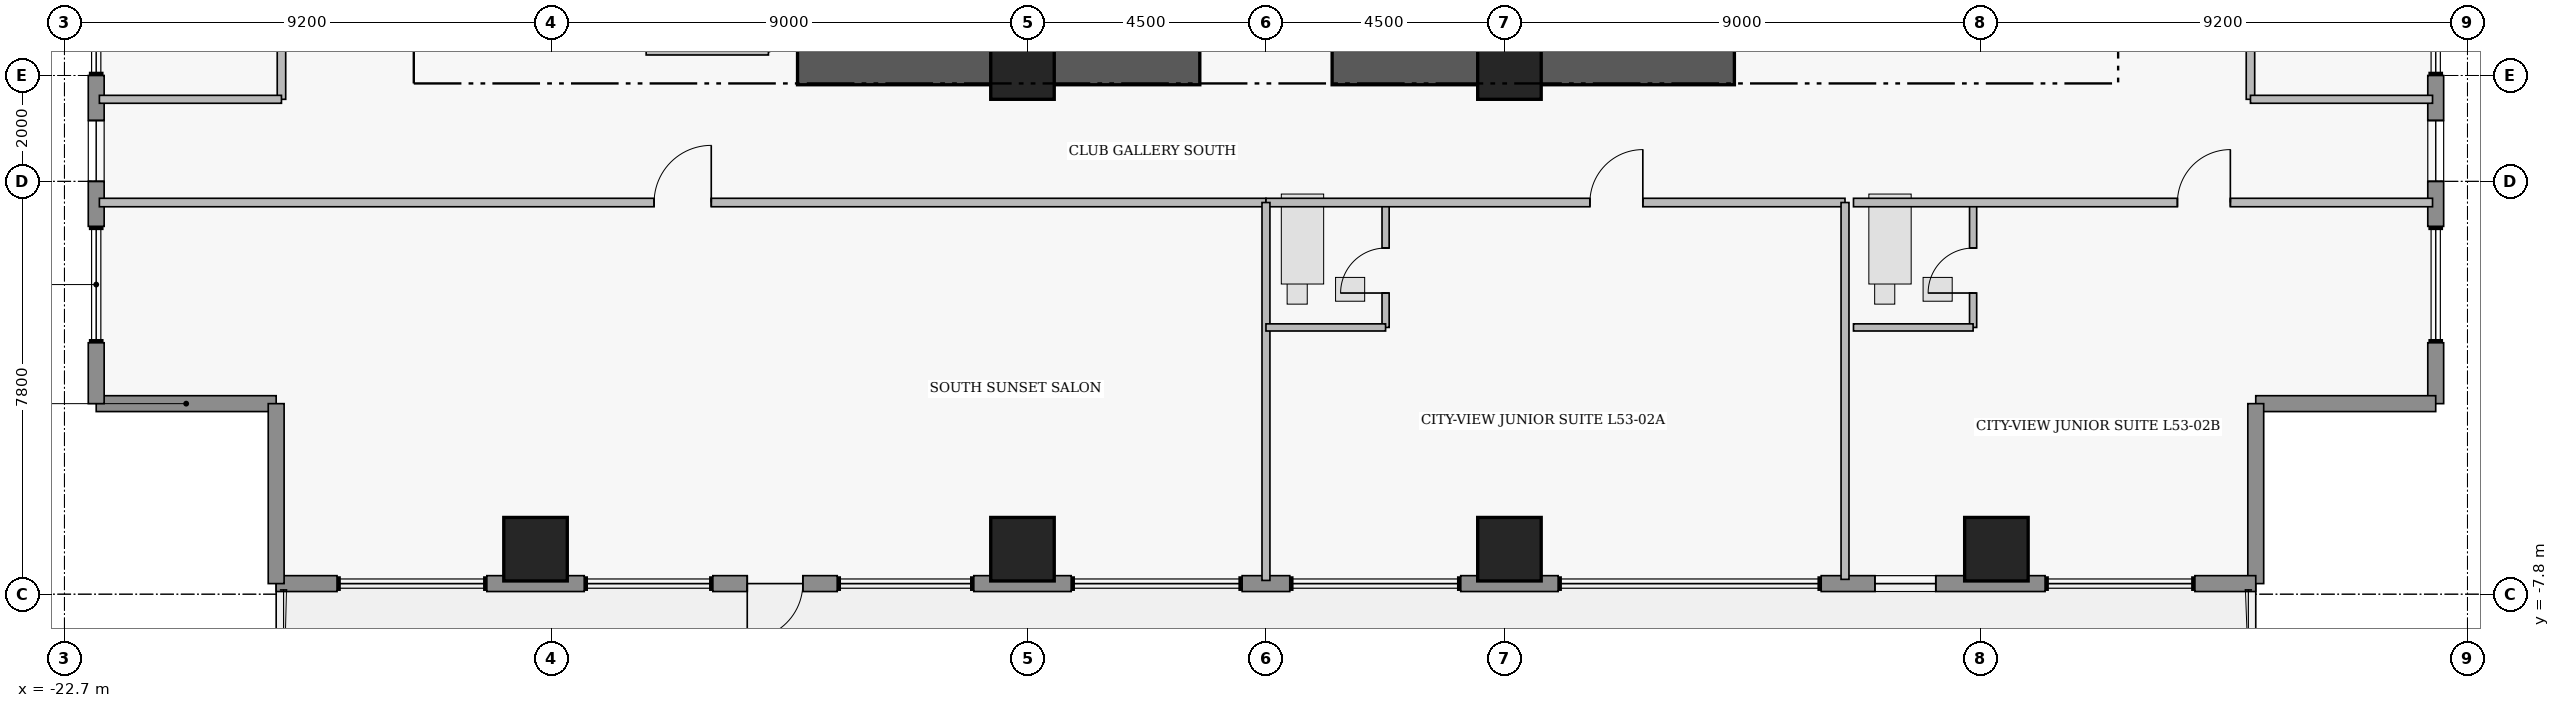
"""IFC4 building model, lengths in metres.
Left out: names, types, materials, properties, quantities, classifications, styles, units other than length and angle.
Written with IfcOpenShell. Run it as: python <this file> out.ifc"""

import sys

from ifc_helpers import new_model, si_unit, direction, frame, frame_2d, origin, origin_2d, place, context, subcontext, project, spatial, rectangle, extrude, element, fill, save


model = new_model("IFC4")
c1 = context("Model", 3, precision=1e-05, world=origin(), true_north=direction((0.0, 1.0)))
c2 = subcontext(c1, "Body", "Model", "MODEL_VIEW")
j1 = project(units=[si_unit("LENGTHUNIT", "METRE"), si_unit("PLANEANGLEUNIT", "RADIAN")], contexts=[c1])
p1 = place(None, origin())
s1 = spatial("IfcSite", under=j1, at=p1, CompositionType="ELEMENT")
p2 = place(p1, origin())
s2 = spatial("IfcBuilding", under=s1, at=p2, CompositionType="ELEMENT")
p3 = place(p2, frame((0.0, 0.0, 211.15)))
s3 = spatial("IfcBuildingStorey", under=s2, at=p3, CompositionType="ELEMENT", Elevation=211.15)
for number, where, z_axis, x_axis in (
    (1, (-8.85, 2.15, 0.0), (0.0, 0.0, 1.0), (1.0, 0.0, 0.0)),
    (2, (1.25, 2.15, 0.0), (0.0, 0.0, 1.0), (1.0, 0.0, 0.0)),
):
    element("IfcWall", number, at=place(p3, frame(where, z_axis=z_axis, x_axis=x_axis)), inside=s3, PredefinedType="SHEAR", context=c2, shape_type="SweptSolid", body=[
        extrude(rectangle(XDim=7.6, YDim=0.65, at=frame_2d((3.8, 0.0))), origin(), (0.0, 0.0, 1.0), 3.53),
    ])
for number, where, z_axis, x_axis in (
    (3, (-4.6, 2.15, 0.0), (0.0, 0.0, 1.0), (1.0, 0.0, 0.0)),
    (4, (4.6, 2.15, 0.0), (0.0, 0.0, 1.0), (1.0, 0.0, 0.0)),
    (5, (-13.8, -6.95, 0.0), (0.0, 0.0, 1.0), (1.0, 0.0, 0.0)),
    (6, (-4.6, -6.95, 0.0), (0.0, 0.0, 1.0), (1.0, 0.0, 0.0)),
    (7, (4.6, -6.95, 0.0), (0.0, 0.0, 1.0), (1.0, 0.0, 0.0)),
    (8, (13.8, -6.95, 0.0), (0.0, 0.0, 1.0), (1.0, 0.0, 0.0)),
):
    element("IfcColumn", number, at=place(p3, frame(where, z_axis=z_axis, x_axis=x_axis)), inside=s3, PredefinedType="COLUMN", context=c2, shape_type="SweptSolid", body=[
        extrude(rectangle(XDim=1.2, YDim=1.2, at=origin_2d()), origin(), (0.0, 0.0, 1.0), 3.75),
    ])
p4 = place(p3, frame((-18.7, -4.2, 0.0), z_axis=(0.0, 0.0, 1.0), x_axis=(-1.0, 0.0, 0.0)))
e9 = element("IfcWall", 9, at=p4, inside=s3, PredefinedType="STANDARD", context=c2, shape_type="SweptSolid", body=[
    extrude(rectangle(XDim=3.4, YDim=0.3, at=frame_2d((1.7, 0.0))), origin(), (0.0, 0.0, 1.0), 3.53),
])
p5 = place(p3, frame((-22.1, -4.2, 0.0), z_axis=(0.0, 0.0, 1.0), x_axis=(0.0, 1.0, 0.0)))
e10 = element("IfcWall", 10, at=p5, inside=s3, PredefinedType="STANDARD", context=c2, shape_type="SweptSolid", body=[
    extrude(rectangle(XDim=1.15, YDim=0.3, at=frame_2d((0.575, 0.0))), origin(), (0.0, 0.0, 1.0), 3.53),
])
p6 = place(p3, frame((-22.1, -0.85, 0.0), z_axis=(0.0, 0.0, 1.0), x_axis=(0.0, 1.0, 0.0)))
e11 = element("IfcWall", 11, at=p6, inside=s3, PredefinedType="STANDARD", context=c2, shape_type="SweptSolid", body=[
    extrude(rectangle(XDim=2.85, YDim=0.3, at=frame_2d((1.425, 0.0))), origin(), (0.0, 0.0, 1.0), 3.53),
])
p7 = place(p6, frame((0.85, 0.0, 0.95)))
e12 = element("IfcOpeningElement", 12, at=p7, cuts=e11, PredefinedType="OPENING", context=c2, shape_type="SweptSolid", body=[
    extrude(rectangle(XDim=1.15, YDim=1.55, at=frame_2d((0.575, 0.775))), frame((0.0, 0.16, 0.0), z_axis=(0.0, -1.0, 0.0), x_axis=(1.0, 0.0, 0.0)), (0.0, 0.0, 1.0), 0.32),
])
p8 = place(p3, frame((22.1, 2.0, 0.0), z_axis=(0.0, 0.0, 1.0), x_axis=(0.0, -1.0, 0.0)))
e13 = element("IfcWall", 13, at=p8, inside=s3, PredefinedType="STANDARD", context=c2, shape_type="SweptSolid", body=[
    extrude(rectangle(XDim=2.85, YDim=0.3, at=frame_2d((1.425, 0.0))), origin(), (0.0, 0.0, 1.0), 3.53),
])
p9 = place(p8, frame((0.85, 0.0, 0.95)))
e14 = element("IfcOpeningElement", 14, at=p9, cuts=e13, PredefinedType="OPENING", context=c2, shape_type="SweptSolid", body=[
    extrude(rectangle(XDim=1.15, YDim=1.55, at=frame_2d((0.575, 0.775))), frame((0.0, 0.16, 0.0), z_axis=(0.0, -1.0, 0.0), x_axis=(1.0, 0.0, 0.0)), (0.0, 0.0, 1.0), 0.32),
])
p10 = place(p3, frame((22.1, -3.05, 0.0), z_axis=(0.0, 0.0, 1.0), x_axis=(0.0, -1.0, 0.0)))
e15 = element("IfcWall", 15, at=p10, inside=s3, PredefinedType="STANDARD", context=c2, shape_type="SweptSolid", body=[
    extrude(rectangle(XDim=1.15, YDim=0.3, at=frame_2d((0.575, 0.0))), origin(), (0.0, 0.0, 1.0), 3.53),
])
for number, where, z_axis, x_axis in (
    (16, (22.1, -4.2, 0.0), (0.0, 0.0, 1.0), (-1.0, 0.0, 0.0)),
    (17, (18.7, -4.2, 0.0), (0.0, 0.0, 1.0), (0.0, -1.0, 0.0)),
):
    element("IfcWall", number, at=place(p3, frame(where, z_axis=z_axis, x_axis=x_axis)), inside=s3, PredefinedType="STANDARD", context=c2, shape_type="SweptSolid", body=[
        extrude(rectangle(XDim=3.4, YDim=0.3, at=frame_2d((1.7, 0.0))), origin(), (0.0, 0.0, 1.0), 3.53),
    ])
p11 = place(p3, frame((18.7, -7.6, 0.0), z_axis=(0.0, 0.0, 1.0), x_axis=(-1.0, 0.0, 0.0)))
e18 = element("IfcWall", 18, at=p11, inside=s3, PredefinedType="STANDARD", context=c2, shape_type="SweptSolid", body=[
    extrude(rectangle(XDim=1.15, YDim=0.3, at=frame_2d((0.575, 0.0))), origin(), (0.0, 0.0, 1.0), 3.53),
])
p12 = place(p3, frame((14.72, -7.6, 0.0), z_axis=(0.0, 0.0, 1.0), x_axis=(-1.0, 0.0, 0.0)))
e19 = element("IfcWall", 19, at=p12, inside=s3, PredefinedType="STANDARD", context=c2, shape_type="SweptSolid", body=[
    extrude(rectangle(XDim=4.23, YDim=0.3, at=frame_2d((2.115, 0.0))), origin(), (0.0, 0.0, 1.0), 3.53),
])
p13 = place(p12, frame((2.065, 0.0, 0.95)))
e20 = element("IfcOpeningElement", 20, at=p13, cuts=e19, PredefinedType="OPENING", context=c2, shape_type="SweptSolid", body=[
    extrude(rectangle(XDim=1.15, YDim=1.55, at=frame_2d((0.575, 0.775))), frame((0.0, 0.16, 0.0), z_axis=(0.0, -1.0, 0.0), x_axis=(1.0, 0.0, 0.0)), (0.0, 0.0, 1.0), 0.32),
])
p14 = place(p3, frame((5.52, -7.6, 0.0), z_axis=(0.0, 0.0, 1.0), x_axis=(-1.0, 0.0, 0.0)))
e21 = element("IfcWall", 21, at=p14, inside=s3, PredefinedType="STANDARD", context=c2, shape_type="SweptSolid", body=[
    extrude(rectangle(XDim=1.84, YDim=0.3, at=frame_2d((0.92, 0.0))), origin(), (0.0, 0.0, 1.0), 3.53),
])
p15 = place(p3, frame((0.45, -7.6, 0.0), z_axis=(0.0, 0.0, 1.0), x_axis=(-1.0, 0.0, 0.0)))
e22 = element("IfcWall", 22, at=p15, inside=s3, PredefinedType="STANDARD", context=c2, shape_type="SweptSolid", body=[
    extrude(rectangle(XDim=0.9, YDim=0.3, at=frame_2d((0.45, 0.0))), origin(), (0.0, 0.0, 1.0), 3.53),
])
p16 = place(p3, frame((-3.68, -7.6, 0.0), z_axis=(0.0, 0.0, 1.0), x_axis=(-1.0, 0.0, 0.0)))
e23 = element("IfcWall", 23, at=p16, inside=s3, PredefinedType="STANDARD", context=c2, shape_type="SweptSolid", body=[
    extrude(rectangle(XDim=1.84, YDim=0.3, at=frame_2d((0.92, 0.0))), origin(), (0.0, 0.0, 1.0), 3.53),
])
p17 = place(p3, frame((-8.1, -7.6, 0.0), z_axis=(0.0, 0.0, 1.0), x_axis=(-1.0, 0.0, 0.0)))
e24 = element("IfcWall", 24, at=p17, inside=s3, PredefinedType="STANDARD", context=c2, shape_type="SweptSolid", body=[
    extrude(rectangle(XDim=2.35, YDim=0.3, at=frame_2d((1.175, 0.0))), origin(), (0.0, 0.0, 1.0), 3.53),
])
p18 = place(p17, frame((0.65, 0.0, 0.0)))
e25 = element("IfcOpeningElement", 25, at=p18, cuts=e24, PredefinedType="OPENING", context=c2, shape_type="SweptSolid", body=[
    extrude(rectangle(XDim=1.05, YDim=2.2, at=frame_2d((0.525, 1.1))), frame((0.0, 0.16, 0.0), z_axis=(0.0, -1.0, 0.0), x_axis=(1.0, 0.0, 0.0)), (0.0, 0.0, 1.0), 0.32),
])
p19 = place(p3, frame((-12.88, -7.6, 0.0), z_axis=(0.0, 0.0, 1.0), x_axis=(-1.0, 0.0, 0.0)))
e26 = element("IfcWall", 26, at=p19, inside=s3, PredefinedType="STANDARD", context=c2, shape_type="SweptSolid", body=[
    extrude(rectangle(XDim=1.84, YDim=0.3, at=frame_2d((0.92, 0.0))), origin(), (0.0, 0.0, 1.0), 3.53),
])
p20 = place(p3, frame((-17.55, -7.6, 0.0), z_axis=(0.0, 0.0, 1.0), x_axis=(-1.0, 0.0, 0.0)))
e27 = element("IfcWall", 27, at=p20, inside=s3, PredefinedType="STANDARD", context=c2, shape_type="SweptSolid", body=[
    extrude(rectangle(XDim=1.15, YDim=0.3, at=frame_2d((0.575, 0.0))), origin(), (0.0, 0.0, 1.0), 3.53),
])
p21 = place(p3, frame((-18.7, -7.6, 0.0), z_axis=(0.0, 0.0, 1.0), x_axis=(0.0, 1.0, 0.0)))
e28 = element("IfcWall", 28, at=p21, inside=s3, PredefinedType="STANDARD", context=c2, shape_type="SweptSolid", body=[
    extrude(rectangle(XDim=3.4, YDim=0.3, at=frame_2d((1.7, 0.0))), origin(), (0.0, 0.0, 1.0), 3.53),
])
p22 = place(p3, frame((-22.04, -0.4, 0.0), z_axis=(0.0, 0.0, 1.0), x_axis=(1.0, 0.0, 0.0)))
e29 = element("IfcWall", 29, at=p22, inside=s3, PredefinedType="PARTITIONING", context=c2, shape_type="SweptSolid", body=[
    extrude(rectangle(XDim=22.04, YDim=0.16, at=frame_2d((11.02, 0.0))), origin(), (0.0, 0.0, 1.0), 3.53),
])
p23 = place(p22, frame((10.48, 0.0, 0.0)))
e30 = element("IfcOpeningElement", 30, at=p23, cuts=e29, PredefinedType="OPENING", context=c2, shape_type="SweptSolid", body=[
    extrude(rectangle(XDim=1.08, YDim=2.18, at=frame_2d((0.54, 1.09))), frame((0.0, 0.09, 0.0), z_axis=(0.0, -1.0, 0.0), x_axis=(1.0, 0.0, 0.0)), (0.0, 0.0, 1.0), 0.18),
])
p24 = place(p3, frame((2.26, -2.76, 0.0), z_axis=(0.0, 0.0, 1.0), x_axis=(0.0, 1.0, 0.0)))
e31 = element("IfcWall", 31, at=p24, inside=s3, PredefinedType="PLUMBINGWALL", context=c2, shape_type="SweptSolid", body=[
    extrude(rectangle(XDim=2.36, YDim=0.135, at=frame_2d((1.18, 0.0))), origin(), (0.0, 0.0, 1.0), 3.53),
])
p25 = place(p24, frame((0.65, 0.0, 0.0)))
e32 = element("IfcOpeningElement", 32, at=p25, cuts=e31, PredefinedType="OPENING", context=c2, shape_type="SweptSolid", body=[
    extrude(rectangle(XDim=0.85, YDim=2.1, at=frame_2d((0.425, 1.05))), frame((0.0, 0.077, 0.0), z_axis=(0.0, -1.0, 0.0), x_axis=(1.0, 0.0, 0.0)), (0.0, 0.0, 1.0), 0.155),
])
p26 = place(p3, frame((0.0, -0.4, 0.0), z_axis=(0.0, 0.0, 1.0), x_axis=(1.0, 0.0, 0.0)))
e33 = element("IfcWall", 33, at=p26, inside=s3, PredefinedType="PARTITIONING", context=c2, shape_type="SweptSolid", body=[
    extrude(rectangle(XDim=10.94, YDim=0.16, at=frame_2d((5.47, 0.0))), origin(), (0.0, 0.0, 1.0), 3.53),
])
p27 = place(p26, frame((6.12, 0.0, 0.0)))
e34 = element("IfcOpeningElement", 34, at=p27, cuts=e33, PredefinedType="OPENING", context=c2, shape_type="SweptSolid", body=[
    extrude(rectangle(XDim=1.0, YDim=2.15, at=frame_2d((0.5, 1.075))), frame((0.0, 0.09, 0.0), z_axis=(0.0, -1.0, 0.0), x_axis=(1.0, 0.0, 0.0)), (0.0, 0.0, 1.0), 0.18),
])
p28 = place(p3, frame((13.36, -2.76, 0.0), z_axis=(0.0, 0.0, 1.0), x_axis=(0.0, 1.0, 0.0)))
e35 = element("IfcWall", 35, at=p28, inside=s3, PredefinedType="PLUMBINGWALL", context=c2, shape_type="SweptSolid", body=[
    extrude(rectangle(XDim=2.36, YDim=0.135, at=frame_2d((1.18, 0.0))), origin(), (0.0, 0.0, 1.0), 2.923),
])
p29 = place(p28, frame((0.65, 0.0, 0.0)))
e36 = element("IfcOpeningElement", 36, at=p29, cuts=e35, PredefinedType="OPENING", context=c2, shape_type="SweptSolid", body=[
    extrude(rectangle(XDim=0.85, YDim=2.1, at=frame_2d((0.425, 1.05))), frame((0.0, 0.077, 0.0), z_axis=(0.0, -1.0, 0.0), x_axis=(1.0, 0.0, 0.0)), (0.0, 0.0, 1.0), 0.155),
])
p30 = place(p3, frame((11.1, -0.4, 0.0), z_axis=(0.0, 0.0, 1.0), x_axis=(1.0, 0.0, 0.0)))
e37 = element("IfcWall", 37, at=p30, inside=s3, PredefinedType="PARTITIONING", context=c2, shape_type="SweptSolid", body=[
    extrude(rectangle(XDim=10.94, YDim=0.16, at=frame_2d((5.47, 0.0))), origin(), (0.0, 0.0, 1.0), 3.53),
])
p31 = place(p30, frame((6.12, 0.0, 0.0)))
e38 = element("IfcOpeningElement", 38, at=p31, cuts=e37, PredefinedType="OPENING", context=c2, shape_type="SweptSolid", body=[
    extrude(rectangle(XDim=1.0, YDim=2.15, at=frame_2d((0.5, 1.075))), frame((0.0, 0.09, 0.0), z_axis=(0.0, -1.0, 0.0), x_axis=(1.0, 0.0, 0.0)), (0.0, 0.0, 1.0), 0.18),
])
p32 = place(p3, frame((18.6, 1.55, 0.0), z_axis=(0.0, 0.0, 1.0), x_axis=(0.0, 1.0, 0.0)))
e39 = element("IfcWall", 39, at=p32, inside=s3, PredefinedType="PARTITIONING", context=c2, shape_type="SweptSolid", body=[
    extrude(rectangle(XDim=5.2, YDim=0.16, at=frame_2d((2.6, 0.0))), origin(), (0.0, 0.0, 1.0), 3.53),
])
p33 = place(p32, frame((2.14, 0.0, 0.0)))
e40 = element("IfcOpeningElement", 40, at=p33, cuts=e39, PredefinedType="OPENING", context=c2, shape_type="SweptSolid", body=[
    extrude(rectangle(XDim=0.92, YDim=2.12, at=frame_2d((0.46, 1.06))), frame((0.0, 0.09, 0.0), z_axis=(0.0, -1.0, 0.0), x_axis=(1.0, 0.0, 0.0)), (0.0, 0.0, 1.0), 0.18),
])
p34 = place(p3, frame((-18.6, 1.55, 0.0), z_axis=(0.0, 0.0, 1.0), x_axis=(0.0, 1.0, 0.0)))
e41 = element("IfcWall", 41, at=p34, inside=s3, PredefinedType="PARTITIONING", context=c2, shape_type="SweptSolid", body=[
    extrude(rectangle(XDim=13.3, YDim=0.16, at=frame_2d((6.65, 0.0))), origin(), (0.0, 0.0, 1.0), 3.53),
])
p35 = place(p34, frame((6.175, 0.0, 0.0)))
e42 = element("IfcOpeningElement", 42, at=p35, cuts=e41, PredefinedType="OPENING", context=c2, shape_type="SweptSolid", body=[
    extrude(rectangle(XDim=0.95, YDim=2.15, at=frame_2d((0.475, 1.075))), frame((0.0, 0.09, 0.0), z_axis=(0.0, -1.0, 0.0), x_axis=(1.0, 0.0, 0.0)), (0.0, 0.0, 1.0), 0.18),
])
p36 = place(p3, frame((-11.71, 2.47, 0.0), z_axis=(0.0, 0.0, 1.0), x_axis=(1.0, 0.0, 0.0)))
e43 = element("IfcWall", 43, at=p36, inside=s3, PredefinedType="PARTITIONING", context=c2, shape_type="SweptSolid", body=[
    extrude(rectangle(XDim=2.31, YDim=0.165, at=frame_2d((1.155, 0.0))), origin(), (0.0, 0.0, 1.0), 2.43),
])
p37 = place(p3, frame((0.0, -7.54, 0.0), z_axis=(0.0, 0.0, 1.0), x_axis=(0.0, 1.0, 0.0)))
e44 = element("IfcWall", 44, at=p37, inside=s3, PredefinedType="PARTITIONING", context=c2, shape_type="SweptSolid", body=[
    extrude(rectangle(XDim=7.14, YDim=0.15, at=frame_2d((3.57, 0.0))), origin(), (0.0, 0.0, 1.0), 3.53),
])
p38 = place(p3, frame((0.0, -2.76, 0.0), z_axis=(0.0, 0.0, 1.0), x_axis=(1.0, 0.0, 0.0)))
e45 = element("IfcWall", 45, at=p38, inside=s3, PredefinedType="PLUMBINGWALL", context=c2, shape_type="SweptSolid", body=[
    extrude(rectangle(XDim=2.26, YDim=0.135, at=frame_2d((1.13, 0.0))), origin(), (0.0, 0.0, 1.0), 3.124),
])
p39 = place(p3, frame((10.94, -7.52, 0.0), z_axis=(0.0, 0.0, 1.0), x_axis=(0.0, 1.0, 0.0)))
e46 = element("IfcWall", 46, at=p39, inside=s3, PredefinedType="PARTITIONING", context=c2, shape_type="SweptSolid", body=[
    extrude(rectangle(XDim=7.12, YDim=0.15, at=frame_2d((3.56, 0.0))), origin(), (0.0, 0.0, 1.0), 3.53),
])
p40 = place(p3, frame((11.1, -2.76, 0.0), z_axis=(0.0, 0.0, 1.0), x_axis=(1.0, 0.0, 0.0)))
e47 = element("IfcWall", 47, at=p40, inside=s3, PredefinedType="PLUMBINGWALL", context=c2, shape_type="SweptSolid", body=[
    extrude(rectangle(XDim=2.26, YDim=0.135, at=frame_2d((1.13, 0.0))), origin(), (0.0, 0.0, 1.0), 3.124),
])
for number, where, z_axis, x_axis in (
    (48, (18.6, 1.55, 0.0), (0.0, 0.0, 1.0), (1.0, 0.0, 0.0)),
    (49, (-22.04, 1.55, 0.0), (0.0, 0.0, 1.0), (1.0, 0.0, 0.0)),
):
    element("IfcWall", number, at=place(p3, frame(where, z_axis=z_axis, x_axis=x_axis)), inside=s3, PredefinedType="PARTITIONING", context=c2, shape_type="SweptSolid", body=[
        extrude(rectangle(XDim=3.44, YDim=0.15, at=frame_2d((1.72, 0.0))), origin(), (0.0, 0.0, 1.0), 3.53),
    ])
p41 = place(p7, origin())
e50 = element("IfcWindow", 50, at=p41, inside=s3, PartitioningType="SINGLE_PANEL", PredefinedType="WINDOW", context=c2, shape_type="SweptSolid", body=[
    extrude(rectangle(XDim=1.15, YDim=1.55, at=frame_2d((0.575, 0.775))), frame((0.0, 0.03, 0.0), z_axis=(0.0, -1.0, 0.0), x_axis=(1.0, 0.0, 0.0)), (0.0, 0.0, 1.0), 0.06),
])
fill(e12, e50)
p42 = place(p9, origin())
e51 = element("IfcWindow", 51, at=p42, inside=s3, PartitioningType="SINGLE_PANEL", PredefinedType="WINDOW", context=c2, shape_type="SweptSolid", body=[
    extrude(rectangle(XDim=1.15, YDim=1.55, at=frame_2d((0.575, 0.775))), frame((0.0, 0.03, 0.0), z_axis=(0.0, -1.0, 0.0), x_axis=(1.0, 0.0, 0.0)), (0.0, 0.0, 1.0), 0.06),
])
fill(e14, e51)
p43 = place(p13, origin())
e52 = element("IfcWindow", 52, at=p43, inside=s3, PartitioningType="SINGLE_PANEL", PredefinedType="WINDOW", context=c2, shape_type="SweptSolid", body=[
    extrude(rectangle(XDim=1.15, YDim=1.55, at=frame_2d((0.575, 0.775))), frame((0.0, 0.03, 0.0), z_axis=(0.0, -1.0, 0.0), x_axis=(1.0, 0.0, 0.0)), (0.0, 0.0, 1.0), 0.06),
])
fill(e20, e52)
p44 = place(p18, origin())
e53 = element("IfcDoor", 53, at=p44, inside=s3, OperationType="SINGLE_SWING_RIGHT", PredefinedType="DOOR", context=c2, shape_type="SweptSolid", body=[
    extrude(rectangle(XDim=1.05, YDim=2.2, at=frame_2d((0.525, 1.1))), frame((0.0, 0.025, 0.0), z_axis=(0.0, -1.0, 0.0), x_axis=(1.0, 0.0, 0.0)), (0.0, 0.0, 1.0), 0.05),
])
fill(e25, e53)
p45 = place(p23, origin())
e54 = element("IfcDoor", 54, at=p45, inside=s3, OperationType="SINGLE_SWING_RIGHT", PredefinedType="DOOR", context=c2, shape_type="SweptSolid", body=[
    extrude(rectangle(XDim=1.08, YDim=2.18, at=frame_2d((0.54, 1.09))), frame((0.0, 0.025, 0.0), z_axis=(0.0, -1.0, 0.0), x_axis=(1.0, 0.0, 0.0)), (0.0, 0.0, 1.0), 0.05),
])
fill(e30, e54)
p46 = place(p25, origin())
e55 = element("IfcDoor", 55, at=p46, inside=s3, OperationType="SINGLE_SWING_LEFT", PredefinedType="DOOR", context=c2, shape_type="SweptSolid", body=[
    extrude(rectangle(XDim=0.85, YDim=2.1, at=frame_2d((0.425, 1.05))), frame((0.0, 0.025, 0.0), z_axis=(0.0, -1.0, 0.0), x_axis=(1.0, 0.0, 0.0)), (0.0, 0.0, 1.0), 0.05),
])
fill(e32, e55)
p47 = place(p27, origin())
e56 = element("IfcDoor", 56, at=p47, inside=s3, OperationType="SINGLE_SWING_RIGHT", PredefinedType="DOOR", context=c2, shape_type="SweptSolid", body=[
    extrude(rectangle(XDim=1.0, YDim=2.15, at=frame_2d((0.5, 1.075))), frame((0.0, 0.025, 0.0), z_axis=(0.0, -1.0, 0.0), x_axis=(1.0, 0.0, 0.0)), (0.0, 0.0, 1.0), 0.05),
])
fill(e34, e56)
p48 = place(p29, origin())
e57 = element("IfcDoor", 57, at=p48, inside=s3, OperationType="SINGLE_SWING_LEFT", PredefinedType="DOOR", context=c2, shape_type="SweptSolid", body=[
    extrude(rectangle(XDim=0.85, YDim=2.1, at=frame_2d((0.425, 1.05))), frame((0.0, 0.025, 0.0), z_axis=(0.0, -1.0, 0.0), x_axis=(1.0, 0.0, 0.0)), (0.0, 0.0, 1.0), 0.05),
])
fill(e36, e57)
p49 = place(p31, origin())
e58 = element("IfcDoor", 58, at=p49, inside=s3, OperationType="SINGLE_SWING_RIGHT", PredefinedType="DOOR", context=c2, shape_type="SweptSolid", body=[
    extrude(rectangle(XDim=1.0, YDim=2.15, at=frame_2d((0.5, 1.075))), frame((0.0, 0.025, 0.0), z_axis=(0.0, -1.0, 0.0), x_axis=(1.0, 0.0, 0.0)), (0.0, 0.0, 1.0), 0.05),
])
fill(e38, e58)
save(model, sys.argv[1])
